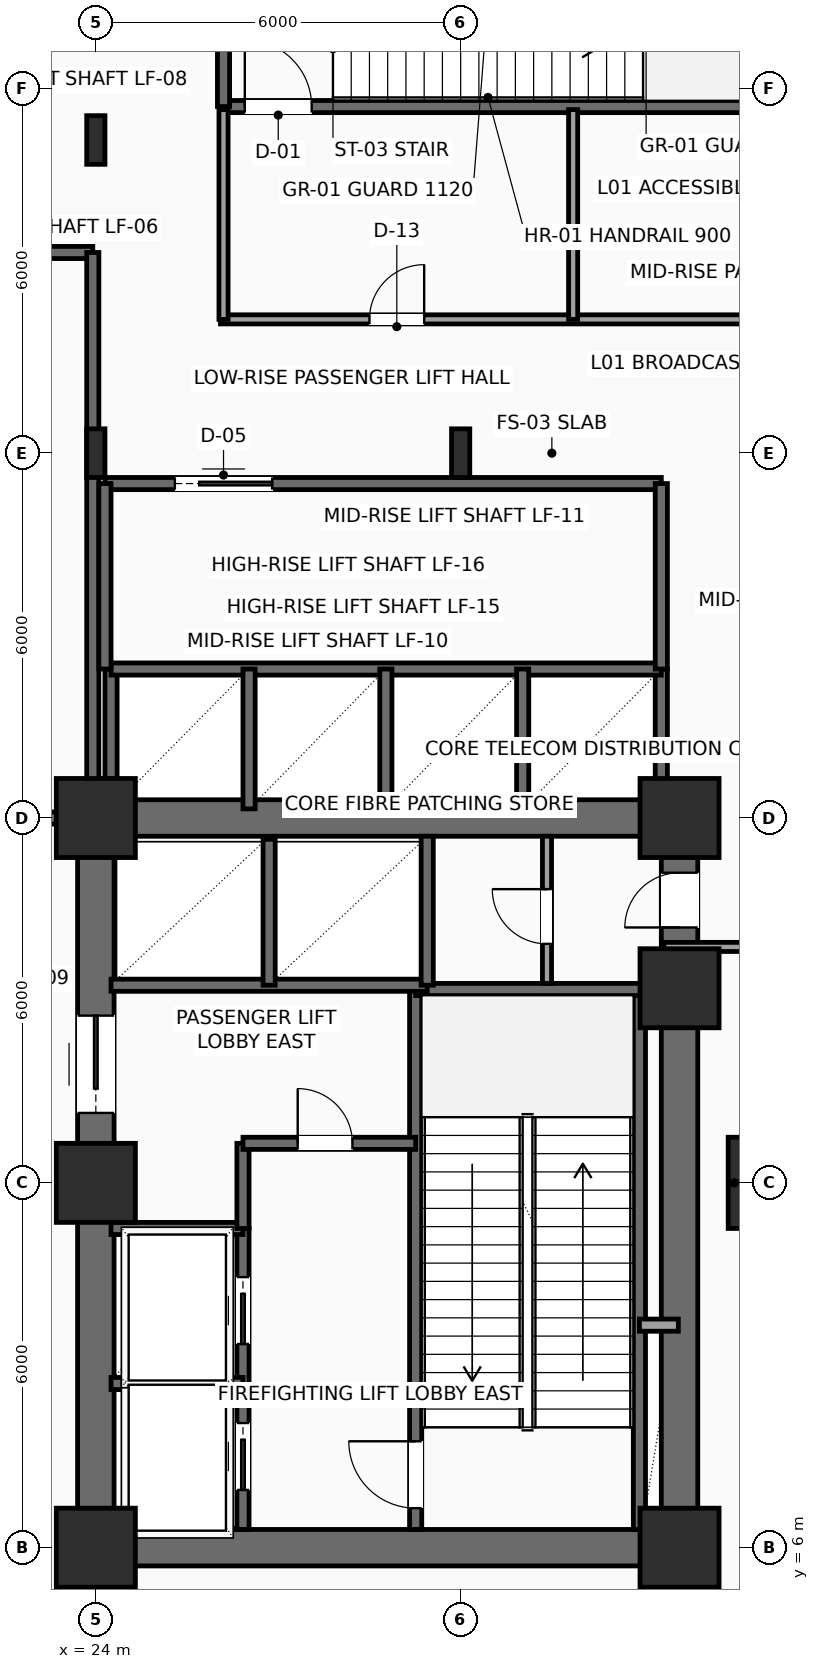
"""IFC4 building model, lengths in metres.
Left out: names, types, materials, properties, quantities, classifications, styles, units other than length and angle.
Written with IfcOpenShell. Run it as: python <this file> out.ifc"""

import sys

from ifc_helpers import new_model, si_unit, direction, frame, frame_2d, origin, origin_2d, place, context, subcontext, project, spatial, rectangle, i_section, extrude, element, fill, save


model = new_model("IFC4")
c1 = context("Model", 3, precision=1e-05, world=origin(), true_north=direction((0.0, 1.0)))
c2 = subcontext(c1, "Body", "Model", "MODEL_VIEW")
j1 = project(units=[si_unit("LENGTHUNIT", "METRE"), si_unit("PLANEANGLEUNIT", "RADIAN")], contexts=[c1])
p1 = place(None, origin())
s1 = spatial("IfcSite", under=j1, at=p1, CompositionType="ELEMENT")
p2 = place(p1, origin())
s2 = spatial("IfcBuilding", under=s1, at=p2, CompositionType="ELEMENT")
p3 = place(p2, frame((0.0, 0.0, 5.7)))
s3 = spatial("IfcBuildingStorey", under=s2, at=p3, CompositionType="ELEMENT", Elevation=5.7)
for number, where, z_axis, x_axis in (
    (1, (24.0, 6.0, 0.0), (0.0, 0.0, 1.0), (1.0, 0.0, 0.0)),
    (2, (24.0, 12.0, 0.0), (0.0, 0.0, 1.0), (1.0, 0.0, 0.0)),
    (3, (24.0, 18.0, 0.0), (0.0, 0.0, 1.0), (1.0, 0.0, 0.0)),
    (4, (33.6, 6.0, 0.0), (0.0, 0.0, 1.0), (1.0, 0.0, 0.0)),
    (5, (33.6, 15.2, 0.0), (0.0, 0.0, 1.0), (1.0, 0.0, 0.0)),
    (6, (33.6, 18.0, 0.0), (0.0, 0.0, 1.0), (1.0, 0.0, 0.0)),
):
    element("IfcColumn", number, at=place(p3, frame(where, z_axis=z_axis, x_axis=x_axis)), inside=s3, PredefinedType="COLUMN", context=c2, shape_type="SweptSolid", body=[
        extrude(rectangle(XDim=1.3, YDim=1.3, at=origin_2d()), origin(), (0.0, 0.0, 1.0), 5.4),
    ])
for number, where, z_axis, x_axis in (
    (7, (24.0, 24.0, 0.0), (0.0, 0.0, 1.0), (1.0, 0.0, 0.0)),
    (8, (24.0, 29.15, 0.0), (0.0, 0.0, 1.0), (1.0, 0.0, 0.0)),
    (9, (30.0, 24.0, 0.0), (0.0, 0.0, 1.0), (1.0, 0.0, 0.0)),
):
    element("IfcColumn", number, at=place(p3, frame(where, z_axis=z_axis, x_axis=x_axis)), inside=s3, PredefinedType="COLUMN", context=c2, shape_type="SweptSolid", body=[
        extrude(i_section(OverallWidth=0.3, OverallDepth=0.8, WebThickness=0.018, FlangeThickness=0.033, FilletRadius=0.03, at=origin_2d()), origin(), (0.0, 0.0, 1.0), 5.4),
    ])
p4 = place(p3, frame((35.15, 12.0, 0.0), z_axis=(0.0, 0.0, 1.0), x_axis=(1.0, 0.0, 0.0)))
e10 = element("IfcColumn", 10, at=p4, inside=s3, PredefinedType="COLUMN", context=c2, shape_type="SweptSolid", body=[
    extrude(rectangle(XDim=1.5, YDim=1.5, at=origin_2d()), origin(), (0.0, 0.0, 1.0), 5.4),
])
for number, where, z_axis, x_axis in (
    (11, (24.0, 6.0, 0.0), (0.0, 0.0, 1.0), (1.0, 0.0, 0.0)),
    (12, (24.0, 18.0, 0.0), (0.0, 0.0, 1.0), (1.0, 0.0, 0.0)),
):
    element("IfcWall", number, at=place(p3, frame(where, z_axis=z_axis, x_axis=x_axis)), inside=s3, PredefinedType="SHEAR", context=c2, shape_type="SweptSolid", body=[
        extrude(rectangle(XDim=9.6, YDim=0.6, at=frame_2d((4.8, 0.0))), origin(), (0.0, 0.0, 1.0), 5.125),
    ])
p5 = place(p3, frame((24.0, 6.0, 0.0), z_axis=(0.0, 0.0, 1.0), x_axis=(0.0, 1.0, 0.0)))
e13 = element("IfcWall", 13, at=p5, inside=s3, PredefinedType="SHEAR", context=c2, shape_type="SweptSolid", body=[
    extrude(rectangle(XDim=12.0, YDim=0.6, at=frame_2d((6.0, 0.0))), origin(), (0.0, 0.0, 1.0), 5.125),
])
p6 = place(p5, frame((7.15, 0.0, 0.0)))
e14 = element("IfcOpeningElement", 14, at=p6, cuts=e13, PredefinedType="OPENING", context=c2, shape_type="SweptSolid", body=[
    extrude(rectangle(XDim=1.6, YDim=2.3, at=frame_2d((0.8, 1.15))), frame((0.0, 0.31, 0.0), z_axis=(0.0, -1.0, 0.0), x_axis=(1.0, 0.0, 0.0)), (0.0, 0.0, 1.0), 0.62),
])
p7 = place(p3, frame((33.6, 6.0, 0.0), z_axis=(0.0, 0.0, 1.0), x_axis=(0.0, 1.0, 0.0)))
e15 = element("IfcWall", 15, at=p7, inside=s3, PredefinedType="SHEAR", context=c2, shape_type="SweptSolid", body=[
    extrude(rectangle(XDim=12.0, YDim=0.6, at=frame_2d((6.0, 0.0))), origin(), (0.0, 0.0, 1.0), 5.125),
])
p8 = place(p7, frame((10.2, 0.0, 0.0)))
e16 = element("IfcOpeningElement", 16, at=p8, cuts=e15, PredefinedType="OPENING", context=c2, shape_type="SweptSolid", body=[
    extrude(rectangle(XDim=0.9, YDim=2.15, at=frame_2d((0.45, 1.075))), frame((0.0, 0.31, 0.0), z_axis=(0.0, -1.0, 0.0), x_axis=(1.0, 0.0, 0.0)), (0.0, 0.0, 1.0), 0.62),
])
p9 = place(p3, frame((29.26, 6.3, 0.0), z_axis=(0.0, 0.0, 1.0), x_axis=(0.0, 1.0, 0.0)))
e17 = element("IfcWall", 17, at=p9, inside=s3, PredefinedType="SHEAR", context=c2, shape_type="SweptSolid", body=[
    extrude(rectangle(XDim=8.88, YDim=0.2, at=frame_2d((4.44, 0.0))), origin(), (0.0, 0.0, 1.0), 5.125),
])
p10 = place(p9, frame((0.35, 0.0, 0.0)))
e18 = element("IfcOpeningElement", 18, at=p10, cuts=e17, PredefinedType="OPENING", context=c2, shape_type="SweptSolid", body=[
    extrude(rectangle(XDim=1.1, YDim=2.2, at=frame_2d((0.55, 1.1))), frame((0.0, 0.11, 0.0), z_axis=(0.0, -1.0, 0.0), x_axis=(1.0, 0.0, 0.0)), (0.0, 0.0, 1.0), 0.22),
])
p11 = place(p3, frame((32.94, 6.3, 0.0), z_axis=(0.0, 0.0, 1.0), x_axis=(0.0, 1.0, 0.0)))
e19 = element("IfcWall", 19, at=p11, inside=s3, PredefinedType="SHEAR", context=c2, shape_type="SweptSolid", body=[
    extrude(rectangle(XDim=8.88, YDim=0.2, at=frame_2d((4.44, 0.0))), origin(), (0.0, 0.0, 1.0), 5.125),
])
p12 = place(p3, frame((29.26, 15.18, 0.0), z_axis=(0.0, 0.0, 1.0), x_axis=(1.0, 0.0, 0.0)))
e20 = element("IfcWall", 20, at=p12, inside=s3, PredefinedType="SHEAR", context=c2, shape_type="SweptSolid", body=[
    extrude(rectangle(XDim=4.04, YDim=0.2, at=frame_2d((2.02, 0.0))), origin(), (0.0, 0.0, 1.0), 5.125),
])
p13 = place(p3, frame((26.42, 6.3, 0.0), z_axis=(0.0, 0.0, 1.0), x_axis=(0.0, 1.0, 0.0)))
e21 = element("IfcWall", 21, at=p13, inside=s3, PredefinedType="SHEAR", context=c2, shape_type="SweptSolid", body=[
    extrude(rectangle(XDim=4.95, YDim=0.2, at=frame_2d((2.475, 0.0))), origin(), (0.0, 0.0, 1.0), 5.125),
])
p14 = place(p13, frame((0.65, 0.0, 0.0)))
e22 = element("IfcOpeningElement", 22, at=p14, cuts=e21, PredefinedType="OPENING", context=c2, shape_type="SweptSolid", body=[
    extrude(rectangle(XDim=1.1, YDim=2.2, at=frame_2d((0.55, 1.1))), frame((0.0, 0.11, 0.0), z_axis=(0.0, -1.0, 0.0), x_axis=(1.0, 0.0, 0.0)), (0.0, 0.0, 1.0), 0.22),
])
p15 = place(p13, frame((3.05, 0.0, 0.0)))
e23 = element("IfcOpeningElement", 23, at=p15, cuts=e21, PredefinedType="OPENING", context=c2, shape_type="SweptSolid", body=[
    extrude(rectangle(XDim=1.1, YDim=2.2, at=frame_2d((0.55, 1.1))), frame((0.0, 0.11, 0.0), z_axis=(0.0, -1.0, 0.0), x_axis=(1.0, 0.0, 0.0)), (0.0, 0.0, 1.0), 0.22),
])
for number, where, z_axis, x_axis in (
    (24, (24.25, 8.7, 0.0), (0.0, 0.0, 1.0), (1.0, 0.0, 0.0)),
    (25, (24.25, 11.25, 0.0), (0.0, 0.0, 1.0), (1.0, 0.0, 0.0)),
):
    element("IfcWall", number, at=place(p3, frame(where, z_axis=z_axis, x_axis=x_axis)), inside=s3, PredefinedType="SHEAR", context=c2, shape_type="SweptSolid", body=[
        extrude(rectangle(XDim=2.17, YDim=0.2, at=frame_2d((1.085, 0.0))), origin(), (0.0, 0.0, 1.0), 5.125),
    ])
p16 = place(p3, frame((26.42, 11.25, 0.0), z_axis=(0.0, 0.0, 1.0), x_axis=(0.0, 1.0, 0.0)))
e26 = element("IfcWall", 26, at=p16, inside=s3, PredefinedType="SHEAR", context=c2, shape_type="SweptSolid", body=[
    extrude(rectangle(XDim=1.4, YDim=0.2, at=frame_2d((0.7, 0.0))), origin(), (0.0, 0.0, 1.0), 5.125),
])
p17 = place(p3, frame((26.42, 12.65, 0.0), z_axis=(0.0, 0.0, 1.0), x_axis=(1.0, 0.0, 0.0)))
e27 = element("IfcWall", 27, at=p17, inside=s3, PredefinedType="SHEAR", context=c2, shape_type="SweptSolid", body=[
    extrude(rectangle(XDim=2.84, YDim=0.2, at=frame_2d((1.42, 0.0))), origin(), (0.0, 0.0, 1.0), 5.125),
])
p18 = place(p17, frame((0.9, 0.0, 0.0)))
e28 = element("IfcOpeningElement", 28, at=p18, cuts=e27, PredefinedType="OPENING", context=c2, shape_type="SweptSolid", body=[
    extrude(rectangle(XDim=0.9, YDim=2.15, at=frame_2d((0.45, 1.075))), frame((0.0, 0.11, 0.0), z_axis=(0.0, -1.0, 0.0), x_axis=(1.0, 0.0, 0.0)), (0.0, 0.0, 1.0), 0.22),
])
p19 = place(p3, frame((32.94, 9.66, 0.0), z_axis=(0.0, 0.0, 1.0), x_axis=(1.0, 0.0, 0.0)))
e29 = element("IfcWall", 29, at=p19, inside=s3, PredefinedType="SOLIDWALL", context=c2, shape_type="SweptSolid", body=[
    extrude(rectangle(XDim=0.64, YDim=0.2, at=frame_2d((0.32, 0.0))), origin(), (0.0, 0.0, 1.0), 5.125),
])
p20 = place(p3, frame((24.25, 15.25, 0.0), z_axis=(0.0, 0.0, 1.0), x_axis=(1.0, 0.0, 0.0)))
e30 = element("IfcWall", 30, at=p20, inside=s3, PredefinedType="SHEAR", context=c2, shape_type="SweptSolid", body=[
    extrude(rectangle(XDim=5.2, YDim=0.2, at=frame_2d((2.6, 0.0))), origin(), (0.0, 0.0, 1.0), 5.125),
])
p21 = place(p3, frame((26.85, 15.25, 0.0), z_axis=(0.0, 0.0, 1.0), x_axis=(0.0, 1.0, 0.0)))
e31 = element("IfcWall", 31, at=p21, inside=s3, PredefinedType="SHEAR", context=c2, shape_type="SweptSolid", body=[
    extrude(rectangle(XDim=2.4, YDim=0.2, at=frame_2d((1.2, 0.0))), origin(), (0.0, 0.0, 1.0), 5.125),
])
p22 = place(p3, frame((29.45, 15.25, 0.0), z_axis=(0.0, 0.0, 1.0), x_axis=(0.0, 1.0, 0.0)))
e32 = element("IfcWall", 32, at=p22, inside=s3, PredefinedType="SHEAR", context=c2, shape_type="SweptSolid", body=[
    extrude(rectangle(XDim=2.45, YDim=0.2, at=frame_2d((1.225, 0.0))), origin(), (0.0, 0.0, 1.0), 5.125),
])
p23 = place(p3, frame((31.42, 15.28, 0.0), z_axis=(0.0, 0.0, 1.0), x_axis=(0.0, 1.0, 0.0)))
e33 = element("IfcWall", 33, at=p23, inside=s3, PredefinedType="PARTITIONING", context=c2, shape_type="SweptSolid", body=[
    extrude(rectangle(XDim=2.42, YDim=0.15, at=frame_2d((1.21, 0.0))), origin(), (0.0, 0.0, 1.0), 5.125),
])
p24 = place(p23, frame((0.65, 0.0, 0.0)))
e34 = element("IfcOpeningElement", 34, at=p24, cuts=e33, PredefinedType="OPENING", context=c2, shape_type="SweptSolid", body=[
    extrude(rectangle(XDim=0.9, YDim=2.15, at=frame_2d((0.45, 1.075))), frame((0.0, 0.085, 0.0), z_axis=(0.0, -1.0, 0.0), x_axis=(1.0, 0.0, 0.0)), (0.0, 0.0, 1.0), 0.17),
])
p25 = place(p3, frame((20.45, 18.0, 0.0), z_axis=(0.0, 0.0, 1.0), x_axis=(1.0, 0.0, 0.0)))
e35 = element("IfcWall", 35, at=p25, inside=s3, PredefinedType="SHEAR", context=c2, shape_type="SweptSolid", body=[
    extrude(rectangle(XDim=3.5, YDim=0.2, at=frame_2d((1.75, 0.0))), origin(), (0.0, 0.0, 1.0), 5.125),
])
p26 = place(p25, frame((0.95, 0.0, 0.0)))
e36 = element("IfcOpeningElement", 36, at=p26, cuts=e35, PredefinedType="OPENING", context=c2, shape_type="SweptSolid", body=[
    extrude(rectangle(XDim=1.6, YDim=2.3, at=frame_2d((0.8, 1.15))), frame((0.0, 0.11, 0.0), z_axis=(0.0, -1.0, 0.0), x_axis=(1.0, 0.0, 0.0)), (0.0, 0.0, 1.0), 0.22),
])
p27 = place(p3, frame((20.45, 27.3, 0.0), z_axis=(0.0, 0.0, 1.0), x_axis=(1.0, 0.0, 0.0)))
e37 = element("IfcWall", 37, at=p27, inside=s3, PredefinedType="SHEAR", context=c2, shape_type="SweptSolid", body=[
    extrude(rectangle(XDim=3.5, YDim=0.2, at=frame_2d((1.75, 0.0))), origin(), (0.0, 0.0, 1.0), 5.125),
])
p28 = place(p3, frame((23.95, 18.0, 0.0), z_axis=(0.0, 0.0, 1.0), x_axis=(0.0, 1.0, 0.0)))
e38 = element("IfcWall", 38, at=p28, inside=s3, PredefinedType="SHEAR", context=c2, shape_type="SweptSolid", body=[
    extrude(rectangle(XDim=9.3, YDim=0.2, at=frame_2d((4.65, 0.0))), origin(), (0.0, 0.0, 1.0), 5.125),
])
for number, where, z_axis, x_axis in (
    (39, (33.3, 18.1, 0.0), (0.0, 0.0, 1.0), (0.0, 1.0, 0.0)),
    (40, (24.25, 18.1, 0.0), (0.0, 0.0, 1.0), (0.0, 1.0, 0.0)),
):
    element("IfcWall", number, at=place(p3, frame(where, z_axis=z_axis, x_axis=x_axis)), inside=s3, PredefinedType="SHEAR", context=c2, shape_type="SweptSolid", body=[
        extrude(rectangle(XDim=2.35, YDim=0.2, at=frame_2d((1.175, 0.0))), origin(), (0.0, 0.0, 1.0), 5.125),
    ])
p29 = place(p3, frame((24.25, 20.45, 0.0), z_axis=(0.0, 0.0, 1.0), x_axis=(1.0, 0.0, 0.0)))
e41 = element("IfcWall", 41, at=p29, inside=s3, PredefinedType="SHEAR", context=c2, shape_type="SweptSolid", body=[
    extrude(rectangle(XDim=9.05, YDim=0.2, at=frame_2d((4.525, 0.0))), origin(), (0.0, 0.0, 1.0), 5.125),
])
for number, where, z_axis, x_axis in (
    (42, (26.52, 18.15, 0.0), (0.0, 0.0, 1.0), (0.0, 1.0, 0.0)),
    (43, (28.77, 18.15, 0.0), (0.0, 0.0, 1.0), (0.0, 1.0, 0.0)),
    (44, (31.02, 18.15, 0.0), (0.0, 0.0, 1.0), (0.0, 1.0, 0.0)),
):
    element("IfcWall", number, at=place(p3, frame(where, z_axis=z_axis, x_axis=x_axis)), inside=s3, PredefinedType="SHEAR", context=c2, shape_type="SweptSolid", body=[
        extrude(rectangle(XDim=2.3, YDim=0.2, at=frame_2d((1.15, 0.0))), origin(), (0.0, 0.0, 1.0), 5.125),
    ])
p30 = place(p3, frame((24.15, 23.5, 0.0), z_axis=(0.0, 0.0, 1.0), x_axis=(1.0, 0.0, 0.0)))
e45 = element("IfcWall", 45, at=p30, inside=s3, PredefinedType="SHEAR", context=c2, shape_type="SweptSolid", body=[
    extrude(rectangle(XDim=9.15, YDim=0.2, at=frame_2d((4.575, 0.0))), origin(), (0.0, 0.0, 1.0), 5.125),
])
p31 = place(p30, frame((1.15, 0.0, 0.0)))
e46 = element("IfcOpeningElement", 46, at=p31, cuts=e45, PredefinedType="OPENING", context=c2, shape_type="SweptSolid", body=[
    extrude(rectangle(XDim=1.6, YDim=2.3, at=frame_2d((0.8, 1.15))), frame((0.0, 0.11, 0.0), z_axis=(0.0, -1.0, 0.0), x_axis=(1.0, 0.0, 0.0)), (0.0, 0.0, 1.0), 0.22),
])
for number, where, z_axis, x_axis in (
    (47, (33.3, 20.45, 0.0), (0.0, 0.0, 1.0), (0.0, 1.0, 0.0)),
    (48, (24.15, 20.45, 0.0), (0.0, 0.0, 1.0), (0.0, 1.0, 0.0)),
):
    element("IfcWall", number, at=place(p3, frame(where, z_axis=z_axis, x_axis=x_axis)), inside=s3, PredefinedType="SHEAR", context=c2, shape_type="SweptSolid", body=[
        extrude(rectangle(XDim=3.05, YDim=0.2, at=frame_2d((1.525, 0.0))), origin(), (0.0, 0.0, 1.0), 5.125),
    ])
p32 = place(p3, frame((26.1, 29.7, 0.0), z_axis=(0.0, 0.0, 1.0), x_axis=(1.0, 0.0, 0.0)))
e49 = element("IfcWall", 49, at=p32, inside=s3, PredefinedType="SHEAR", context=c2, shape_type="SweptSolid", body=[
    extrude(rectangle(XDim=9.05, YDim=0.2, at=frame_2d((4.525, 0.0))), origin(), (0.0, 0.0, 1.0), 5.125),
])
p33 = place(p32, frame((0.35, 0.0, 0.0)))
e50 = element("IfcOpeningElement", 50, at=p33, cuts=e49, PredefinedType="OPENING", context=c2, shape_type="SweptSolid", body=[
    extrude(rectangle(XDim=1.1, YDim=2.2, at=frame_2d((0.55, 1.1))), frame((0.0, 0.11, 0.0), z_axis=(0.0, -1.0, 0.0), x_axis=(1.0, 0.0, 0.0)), (0.0, 0.0, 1.0), 0.22),
])
p34 = place(p3, frame((26.1, 29.7, 0.0), z_axis=(0.0, 0.0, 1.0), x_axis=(0.0, 1.0, 0.0)))
e51 = element("IfcWall", 51, at=p34, inside=s3, PredefinedType="SHEAR", context=c2, shape_type="SweptSolid", body=[
    extrude(rectangle(XDim=3.76, YDim=0.2, at=frame_2d((1.88, 0.0))), origin(), (0.0, 0.0, 1.0), 5.125),
])
p35 = place(p3, frame((36.15, 15.88, 0.0), z_axis=(0.0, 0.0, 1.0), x_axis=(-1.0, 0.0, 0.0)))
e52 = element("IfcWall", 52, at=p35, inside=s3, PredefinedType="PARTITIONING", context=c2, shape_type="SweptSolid", body=[
    extrude(rectangle(XDim=2.81, YDim=0.15, at=frame_2d((1.405, 0.0))), origin(), (0.0, 0.0, 1.0), 5.125),
])
p36 = place(p3, frame((26.05, 26.2, 0.0), z_axis=(0.0, 0.0, 1.0), x_axis=(1.0, 0.0, 0.0)))
e53 = element("IfcWall", 53, at=p36, inside=s3, PredefinedType="PARTITIONING", context=c2, shape_type="SweptSolid", body=[
    extrude(rectangle(XDim=33.55, YDim=0.15, at=frame_2d((16.775, 0.0))), origin(), (0.0, 0.0, 1.0), 5.125),
])
p37 = place(p36, frame((2.45, 0.0, 0.0)))
e54 = element("IfcOpeningElement", 54, at=p37, cuts=e53, PredefinedType="OPENING", context=c2, shape_type="SweptSolid", body=[
    extrude(rectangle(XDim=0.9, YDim=2.1, at=frame_2d((0.45, 1.05))), frame((0.0, 0.085, 0.0), z_axis=(0.0, -1.0, 0.0), x_axis=(1.0, 0.0, 0.0)), (0.0, 0.0, 1.0), 0.17),
])
p38 = place(p36, frame((12.7, 0.0, 0.0)))
e55 = element("IfcOpeningElement", 55, at=p38, cuts=e53, PredefinedType="OPENING", context=c2, shape_type="SweptSolid", body=[
    extrude(rectangle(XDim=0.95, YDim=2.15, at=frame_2d((0.475, 1.075))), frame((0.0, 0.085, 0.0), z_axis=(0.0, -1.0, 0.0), x_axis=(1.0, 0.0, 0.0)), (0.0, 0.0, 1.0), 0.17),
])
p39 = place(p36, frame((22.275, 0.0, 0.0)))
e56 = element("IfcOpeningElement", 56, at=p39, cuts=e53, PredefinedType="OPENING", context=c2, shape_type="SweptSolid", body=[
    extrude(rectangle(XDim=0.95, YDim=2.15, at=frame_2d((0.475, 1.075))), frame((0.0, 0.085, 0.0), z_axis=(0.0, -1.0, 0.0), x_axis=(1.0, 0.0, 0.0)), (0.0, 0.0, 1.0), 0.17),
])
p40 = place(p36, frame((30.475, 0.0, 0.0)))
e57 = element("IfcOpeningElement", 57, at=p40, cuts=e53, PredefinedType="OPENING", context=c2, shape_type="SweptSolid", body=[
    extrude(rectangle(XDim=0.95, YDim=2.15, at=frame_2d((0.475, 1.075))), frame((0.0, 0.085, 0.0), z_axis=(0.0, -1.0, 0.0), x_axis=(1.0, 0.0, 0.0)), (0.0, 0.0, 1.0), 0.17),
])
for number, where, z_axis, x_axis in (
    (58, (26.1, 26.2, 0.0), (0.0, 0.0, 1.0), (0.0, 1.0, 0.0)),
    (59, (31.85, 26.2, 0.0), (0.0, 0.0, 1.0), (0.0, 1.0, 0.0)),
):
    element("IfcWall", number, at=place(p3, frame(where, z_axis=z_axis, x_axis=x_axis)), inside=s3, PredefinedType="PARTITIONING", context=c2, shape_type="SweptSolid", body=[
        extrude(rectangle(XDim=3.45, YDim=0.15, at=frame_2d((1.725, 0.0))), origin(), (0.0, 0.0, 1.0), 5.125),
    ])
p41 = place(p6, origin())
e60 = element("IfcDoor", 60, at=p41, inside=s3, OperationType="DOUBLE_DOOR_SLIDING", PredefinedType="DOOR", context=c2, shape_type="SweptSolid", body=[
    extrude(rectangle(XDim=1.6, YDim=2.3, at=frame_2d((0.8, 1.15))), frame((0.0, 0.025, 0.0), z_axis=(0.0, -1.0, 0.0), x_axis=(1.0, 0.0, 0.0)), (0.0, 0.0, 1.0), 0.05),
])
fill(e14, e60)
p42 = place(p8, origin())
e61 = element("IfcDoor", 61, at=p42, inside=s3, OperationType="SINGLE_SWING_LEFT", PredefinedType="DOOR", context=c2, shape_type="SweptSolid", body=[
    extrude(rectangle(XDim=0.9, YDim=2.15, at=frame_2d((0.45, 1.075))), frame((0.0, 0.025, 0.0), z_axis=(0.0, -1.0, 0.0), x_axis=(1.0, 0.0, 0.0)), (0.0, 0.0, 1.0), 0.05),
])
fill(e16, e61)
p43 = place(p10, origin())
e62 = element("IfcDoor", 62, at=p43, inside=s3, OperationType="SINGLE_SWING_RIGHT", PredefinedType="DOOR", context=c2, shape_type="SweptSolid", body=[
    extrude(rectangle(XDim=1.1, YDim=2.2, at=frame_2d((0.55, 1.1))), frame((0.0, 0.025, 0.0), z_axis=(0.0, -1.0, 0.0), x_axis=(1.0, 0.0, 0.0)), (0.0, 0.0, 1.0), 0.05),
])
fill(e18, e62)
p44 = place(p14, origin())
e63 = element("IfcDoor", 63, at=p44, inside=s3, OperationType="SLIDING_TO_LEFT", PredefinedType="DOOR", context=c2, shape_type="SweptSolid", body=[
    extrude(rectangle(XDim=1.1, YDim=2.2, at=frame_2d((0.55, 1.1))), frame((0.0, 0.025, 0.0), z_axis=(0.0, -1.0, 0.0), x_axis=(1.0, 0.0, 0.0)), (0.0, 0.0, 1.0), 0.05),
])
fill(e22, e63)
p45 = place(p15, origin())
e64 = element("IfcDoor", 64, at=p45, inside=s3, OperationType="SLIDING_TO_LEFT", PredefinedType="DOOR", context=c2, shape_type="SweptSolid", body=[
    extrude(rectangle(XDim=1.1, YDim=2.2, at=frame_2d((0.55, 1.1))), frame((0.0, 0.025, 0.0), z_axis=(0.0, -1.0, 0.0), x_axis=(1.0, 0.0, 0.0)), (0.0, 0.0, 1.0), 0.05),
])
fill(e23, e64)
p46 = place(p18, origin())
e65 = element("IfcDoor", 65, at=p46, inside=s3, OperationType="SINGLE_SWING_LEFT", PredefinedType="DOOR", context=c2, shape_type="SweptSolid", body=[
    extrude(rectangle(XDim=0.9, YDim=2.15, at=frame_2d((0.45, 1.075))), frame((0.0, 0.025, 0.0), z_axis=(0.0, -1.0, 0.0), x_axis=(1.0, 0.0, 0.0)), (0.0, 0.0, 1.0), 0.05),
])
fill(e28, e65)
p47 = place(p24, origin())
e66 = element("IfcDoor", 66, at=p47, inside=s3, OperationType="SINGLE_SWING_RIGHT", PredefinedType="DOOR", context=c2, shape_type="SweptSolid", body=[
    extrude(rectangle(XDim=0.9, YDim=2.15, at=frame_2d((0.45, 1.075))), frame((0.0, 0.025, 0.0), z_axis=(0.0, -1.0, 0.0), x_axis=(1.0, 0.0, 0.0)), (0.0, 0.0, 1.0), 0.05),
])
fill(e34, e66)
p48 = place(p31, origin())
e67 = element("IfcDoor", 67, at=p48, inside=s3, OperationType="DOUBLE_DOOR_SLIDING", PredefinedType="DOOR", context=c2, shape_type="SweptSolid", body=[
    extrude(rectangle(XDim=1.6, YDim=2.3, at=frame_2d((0.8, 1.15))), frame((0.0, 0.025, 0.0), z_axis=(0.0, -1.0, 0.0), x_axis=(1.0, 0.0, 0.0)), (0.0, 0.0, 1.0), 0.05),
])
fill(e46, e67)
p49 = place(p33, origin())
e68 = element("IfcDoor", 68, at=p49, inside=s3, OperationType="SINGLE_SWING_LEFT", PredefinedType="DOOR", context=c2, shape_type="SweptSolid", body=[
    extrude(rectangle(XDim=1.1, YDim=2.2, at=frame_2d((0.55, 1.1))), frame((0.0, 0.025, 0.0), z_axis=(0.0, -1.0, 0.0), x_axis=(1.0, 0.0, 0.0)), (0.0, 0.0, 1.0), 0.05),
])
fill(e50, e68)
p50 = place(p37, origin())
e69 = element("IfcDoor", 69, at=p50, inside=s3, OperationType="SINGLE_SWING_RIGHT", PredefinedType="DOOR", context=c2, shape_type="SweptSolid", body=[
    extrude(rectangle(XDim=0.9, YDim=2.1, at=frame_2d((0.45, 1.05))), frame((0.0, 0.025, 0.0), z_axis=(0.0, -1.0, 0.0), x_axis=(1.0, 0.0, 0.0)), (0.0, 0.0, 1.0), 0.05),
])
fill(e54, e69)
save(model, sys.argv[1])
